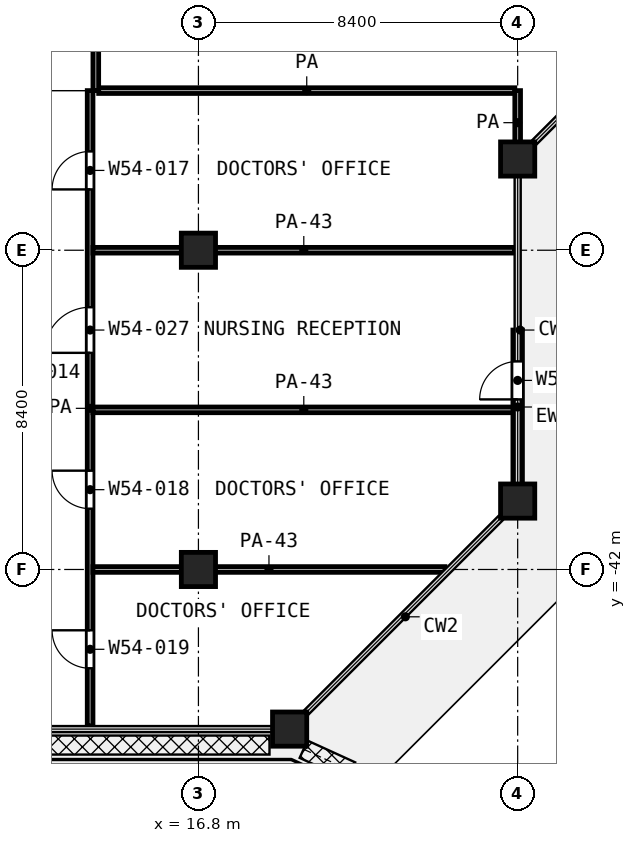
"""IFC4 building model, lengths in metres.
Left out: names, types, materials, properties, quantities, classifications, styles, units other than length and angle.
Written with IfcOpenShell. Run it as: python <this file> out.ifc"""

import sys

from ifc_helpers import new_model, si_unit, direction, frame, frame_2d, origin, origin_2d, place, context, subcontext, project, spatial, rectangle, extrude, element, fill, save


model = new_model("IFC4")
c1 = context("Model", 3, precision=1e-05, world=origin(), true_north=direction((0.0, 1.0)))
c2 = subcontext(c1, "Body", "Model", "MODEL_VIEW")
j1 = project(units=[si_unit("LENGTHUNIT", "METRE"), si_unit("PLANEANGLEUNIT", "RADIAN")], contexts=[c1])
p1 = place(None, origin())
s1 = spatial("IfcSite", under=j1, at=p1, CompositionType="ELEMENT")
p2 = place(p1, origin())
s2 = spatial("IfcBuilding", under=s1, at=p2, CompositionType="ELEMENT")
p3 = place(p2, frame((0.0, 0.0, 234.8)))
s3 = spatial("IfcBuildingStorey", under=s2, at=p3, CompositionType="ELEMENT", Elevation=234.8)
for number, where, z_axis, x_axis in (
    (1, (25.2, -31.2, 0.0), (0.0, 0.0, 1.0), (1.0, 0.0, 0.0)),
    (2, (16.8, -33.6, 0.0), (0.0, 0.0, 1.0), (1.0, 0.0, 0.0)),
    (3, (25.2, -40.2, 0.0), (0.0, 0.0, 1.0), (1.0, 0.0, 0.0)),
    (4, (16.8, -42.0, 0.0), (0.0, 0.0, 1.0), (1.0, 0.0, 0.0)),
    (5, (19.2, -46.2, 0.0), (0.0, 0.0, 1.0), (1.0, 0.0, 0.0)),
):
    element("IfcColumn", number, at=place(p3, frame(where, z_axis=z_axis, x_axis=x_axis)), inside=s3, PredefinedType="COLUMN", context=c2, shape_type="SweptSolid", body=[
        extrude(rectangle(XDim=0.9, YDim=0.9, at=origin_2d()), origin(), (0.0, 0.0, 1.0), 4.2),
    ])
p4 = place(p3, frame((25.2, -39.75, 0.0), z_axis=(0.0, 0.0, 1.0), x_axis=(0.0, 1.0, 0.0)))
e6 = element("IfcWall", 6, at=p4, inside=s3, PredefinedType="SOLIDWALL", context=c2, shape_type="SweptSolid", body=[
    extrude(rectangle(XDim=4.05, YDim=0.25, at=frame_2d((2.025, 0.0))), origin(), (0.0, 0.0, 1.0), 2.58),
])
p5 = place(p4, frame((2.225, 0.0, 0.0)))
e7 = element("IfcOpeningElement", 7, at=p5, cuts=e6, PredefinedType="OPENING", context=c2, shape_type="SweptSolid", body=[
    extrude(rectangle(XDim=1.0, YDim=2.1, at=frame_2d((0.5, 1.05))), frame((0.0, 0.135, 0.0), z_axis=(0.0, -1.0, 0.0), x_axis=(1.0, 0.0, 0.0)), (0.0, 0.0, 1.0), 0.27),
])
p6 = place(p3, frame((14.025, -42.0, 0.0), z_axis=(0.0, 0.0, 1.0), x_axis=(1.0, 0.0, 0.0)))
e8 = element("IfcWall", 8, at=p6, inside=s3, PredefinedType="PARTITIONING", context=c2, shape_type="SweptSolid", body=[
    extrude(rectangle(XDim=9.262, YDim=0.15, at=frame_2d((4.631, 0.0))), origin(), (0.0, 0.0, 1.0), 2.7),
])
for number, where, z_axis, x_axis in (
    (9, (14.025, -37.8, 0.0), (0.0, 0.0, 1.0), (1.0, 0.0, 0.0)),
    (10, (14.025, -33.6, 0.0), (0.0, 0.0, 1.0), (1.0, 0.0, 0.0)),
):
    element("IfcWall", number, at=place(p3, frame(where, z_axis=z_axis, x_axis=x_axis)), inside=s3, PredefinedType="PARTITIONING", context=c2, shape_type="SweptSolid", body=[
        extrude(rectangle(XDim=11.095, YDim=0.15, at=frame_2d((5.548, 0.0))), origin(), (0.0, 0.0, 1.0), 2.7),
    ])
p7 = place(p3, frame((14.175, -29.4, 0.0), z_axis=(0.0, 0.0, 1.0), x_axis=(1.0, 0.0, 0.0)))
e11 = element("IfcWall", 11, at=p7, inside=s3, PredefinedType="PARTITIONING", context=c2, shape_type="SweptSolid", body=[
    extrude(rectangle(XDim=10.95, YDim=0.15, at=frame_2d((5.475, 0.0))), origin(), (0.0, 0.0, 1.0), 3.6),
])
p8 = place(p3, frame((13.95, -46.12, 0.0), z_axis=(0.0, 0.0, 1.0), x_axis=(0.0, 1.0, 0.0)))
e12 = element("IfcWall", 12, at=p8, inside=s3, PredefinedType="PARTITIONING", context=c2, shape_type="SweptSolid", body=[
    extrude(rectangle(XDim=16.72, YDim=0.15, at=frame_2d((8.36, 0.0))), origin(), (0.0, 0.0, 1.0), 3.6),
])
p9 = place(p8, frame((14.12, 0.0, 0.0)))
e13 = element("IfcOpeningElement", 13, at=p9, cuts=e12, PredefinedType="OPENING", context=c2, shape_type="SweptSolid", body=[
    extrude(rectangle(XDim=1.0, YDim=2.1, at=frame_2d((0.5, 1.05))), frame((0.0, 0.085, 0.0), z_axis=(0.0, -1.0, 0.0), x_axis=(1.0, 0.0, 0.0)), (0.0, 0.0, 1.0), 0.17),
])
p10 = place(p8, frame((9.82, 0.0, 0.0)))
e14 = element("IfcOpeningElement", 14, at=p10, cuts=e12, PredefinedType="OPENING", context=c2, shape_type="SweptSolid", body=[
    extrude(rectangle(XDim=1.2, YDim=2.1, at=frame_2d((0.6, 1.05))), frame((0.0, 0.085, 0.0), z_axis=(0.0, -1.0, 0.0), x_axis=(1.0, 0.0, 0.0)), (0.0, 0.0, 1.0), 0.17),
])
p11 = place(p8, frame((5.72, 0.0, 0.0)))
e15 = element("IfcOpeningElement", 15, at=p11, cuts=e12, PredefinedType="OPENING", context=c2, shape_type="SweptSolid", body=[
    extrude(rectangle(XDim=1.0, YDim=2.1, at=frame_2d((0.5, 1.05))), frame((0.0, 0.085, 0.0), z_axis=(0.0, -1.0, 0.0), x_axis=(1.0, 0.0, 0.0)), (0.0, 0.0, 1.0), 0.17),
])
p12 = place(p8, frame((1.52, 0.0, 0.0)))
e16 = element("IfcOpeningElement", 16, at=p12, cuts=e12, PredefinedType="OPENING", context=c2, shape_type="SweptSolid", body=[
    extrude(rectangle(XDim=1.0, YDim=2.1, at=frame_2d((0.5, 1.05))), frame((0.0, 0.085, 0.0), z_axis=(0.0, -1.0, 0.0), x_axis=(1.0, 0.0, 0.0)), (0.0, 0.0, 1.0), 0.17),
])
p13 = place(p3, frame((14.1, -29.4, 0.0), z_axis=(0.0, 0.0, 1.0), x_axis=(0.0, 1.0, 0.0)))
e17 = element("IfcWall", 17, at=p13, inside=s3, PredefinedType="PARTITIONING", context=c2, shape_type="SweptSolid", body=[
    extrude(rectangle(XDim=4.6, YDim=0.15, at=frame_2d((2.3, 0.0))), origin(), (0.0, 0.0, 1.0), 3.6),
])
p14 = place(p3, frame((25.2, -31.087, 0.0), z_axis=(0.0, 0.0, 1.0), x_axis=(0.0, 1.0, 0.0)))
e18 = element("IfcWall", 18, at=p14, inside=s3, PredefinedType="PARTITIONING", context=c2, shape_type="SweptSolid", body=[
    extrude(rectangle(XDim=1.687, YDim=0.15, at=frame_2d((0.844, 0.0))), origin(), (0.0, 0.0, 1.0), 3.6),
])
p15 = place(p5, origin())
e19 = element("IfcDoor", 19, at=p15, inside=s3, OperationType="SINGLE_SWING_LEFT", PredefinedType="DOOR", context=c2, shape_type="SweptSolid", body=[
    extrude(rectangle(XDim=1.0, YDim=2.1, at=frame_2d((0.5, 1.05))), frame((0.0, 0.025, 0.0), z_axis=(0.0, -1.0, 0.0), x_axis=(1.0, 0.0, 0.0)), (0.0, 0.0, 1.0), 0.05),
])
fill(e7, e19)
p16 = place(p9, origin())
e20 = element("IfcDoor", 20, at=p16, inside=s3, OperationType="SINGLE_SWING_LEFT", PredefinedType="DOOR", context=c2, shape_type="SweptSolid", body=[
    extrude(rectangle(XDim=1.0, YDim=2.1, at=frame_2d((0.5, 1.05))), frame((0.0, 0.025, 0.0), z_axis=(0.0, -1.0, 0.0), x_axis=(1.0, 0.0, 0.0)), (0.0, 0.0, 1.0), 0.05),
])
fill(e13, e20)
p17 = place(p10, origin())
e21 = element("IfcDoor", 21, at=p17, inside=s3, OperationType="SINGLE_SWING_LEFT", PredefinedType="DOOR", context=c2, shape_type="SweptSolid", body=[
    extrude(rectangle(XDim=1.2, YDim=2.1, at=frame_2d((0.6, 1.05))), frame((0.0, 0.025, 0.0), z_axis=(0.0, -1.0, 0.0), x_axis=(1.0, 0.0, 0.0)), (0.0, 0.0, 1.0), 0.05),
])
fill(e14, e21)
p18 = place(p11, origin())
e22 = element("IfcDoor", 22, at=p18, inside=s3, OperationType="SINGLE_SWING_RIGHT", PredefinedType="DOOR", context=c2, shape_type="SweptSolid", body=[
    extrude(rectangle(XDim=1.0, YDim=2.1, at=frame_2d((0.5, 1.05))), frame((0.0, 0.025, 0.0), z_axis=(0.0, -1.0, 0.0), x_axis=(1.0, 0.0, 0.0)), (0.0, 0.0, 1.0), 0.05),
])
fill(e15, e22)
p19 = place(p12, origin())
e23 = element("IfcDoor", 23, at=p19, inside=s3, OperationType="SINGLE_SWING_RIGHT", PredefinedType="DOOR", context=c2, shape_type="SweptSolid", body=[
    extrude(rectangle(XDim=1.0, YDim=2.1, at=frame_2d((0.5, 1.05))), frame((0.0, 0.025, 0.0), z_axis=(0.0, -1.0, 0.0), x_axis=(1.0, 0.0, 0.0)), (0.0, 0.0, 1.0), 0.05),
])
fill(e16, e23)
save(model, sys.argv[1])
